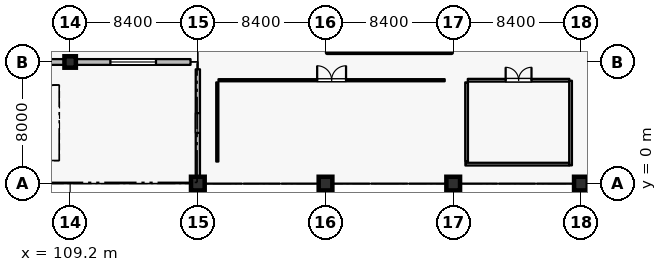
"""IFC4 building model, lengths in metres.
Left out: names, types, materials, properties, quantities, classifications, styles, units other than length and angle.
Written with IfcOpenShell. Run it as: python <this file> out.ifc"""

import sys

from ifc_helpers import new_model, si_unit, direction, frame, frame_2d, origin, origin_2d, place, context, subcontext, project, spatial, rectangle, circle, extrude, element, fill, save


model = new_model("IFC4")
c1 = context("Model", 3, precision=1e-05, world=origin(), true_north=direction((0.0, 1.0)))
c2 = subcontext(c1, "Body", "Model", "MODEL_VIEW")
j1 = project(units=[si_unit("LENGTHUNIT", "METRE"), si_unit("PLANEANGLEUNIT", "RADIAN")], contexts=[c1])
p1 = place(None, origin())
s1 = spatial("IfcSite", under=j1, at=p1, CompositionType="ELEMENT")
p2 = place(p1, origin())
s2 = spatial("IfcBuilding", under=s1, at=p2, CompositionType="ELEMENT")
p3 = place(p2, frame((0.0, 0.0, 6.0)))
s3 = spatial("IfcBuildingStorey", under=s2, at=p3, CompositionType="ELEMENT", Elevation=6.0)
p4 = place(p3, frame((109.2, 8.0, 0.0), z_axis=(0.0, 0.0, 1.0), x_axis=(1.0, 0.0, 0.0)))
e1 = element("IfcColumn", 1, at=p4, inside=s3, PredefinedType="COLUMN", context=c2, shape_type="SweptSolid", body=[
    extrude(rectangle(XDim=0.75, YDim=0.75, at=origin_2d()), origin(), (0.0, 0.0, 1.0), 5.4),
])
for number, where, z_axis, x_axis in (
    (2, (117.6, 0.0, 0.0), (0.0, 0.0, 1.0), (1.0, 0.0, 0.0)),
    (3, (126.0, 0.0, 0.0), (0.0, 0.0, 1.0), (1.0, 0.0, 0.0)),
    (4, (134.4, 0.0, 0.0), (0.0, 0.0, 1.0), (1.0, 0.0, 0.0)),
    (5, (142.8, 0.0, 0.0), (0.0, 0.0, 1.0), (1.0, 0.0, 0.0)),
):
    element("IfcColumn", number, at=place(p3, frame(where, z_axis=z_axis, x_axis=x_axis)), inside=s3, PredefinedType="COLUMN", context=c2, shape_type="SweptSolid", body=[
        extrude(circle(Radius=0.45, at=origin_2d()), origin(), (0.0, 0.0, 1.0), 5.4),
    ])
p5 = place(p3, frame((117.12, 8.0, 0.0), z_axis=(0.0, 0.0, 1.0), x_axis=(-1.0, 0.0, 0.0)))
e6 = element("IfcWall", 6, at=p5, inside=s3, PredefinedType="SOLIDWALL", context=c2, shape_type="SweptSolid", body=[
    extrude(rectangle(XDim=7.545, YDim=0.38, at=frame_2d((3.772, 0.0))), origin(), (0.0, 0.0, 1.0), 5.1),
])
p6 = place(p5, frame((2.273, 0.0, 0.95)))
e7 = element("IfcOpeningElement", 7, at=p6, cuts=e6, PredefinedType="OPENING", context=c2, shape_type="SweptSolid", body=[
    extrude(rectangle(XDim=3.0, YDim=2.2, at=frame_2d((1.5, 1.1))), frame((0.0, 0.2, 0.0), z_axis=(0.0, -1.0, 0.0), x_axis=(1.0, 0.0, 0.0)), (0.0, 0.0, 1.0), 0.4),
])
p7 = place(p3, frame((108.825, 8.0, 0.0), z_axis=(0.0, 0.0, 1.0), x_axis=(-1.0, 0.0, 0.0)))
e8 = element("IfcWall", 8, at=p7, inside=s3, PredefinedType="SOLIDWALL", context=c2, shape_type="SweptSolid", body=[
    extrude(rectangle(XDim=7.65, YDim=0.38, at=frame_2d((3.825, 0.0))), origin(), (0.0, 0.0, 1.0), 4.45),
])
p8 = place(p7, frame((2.825, 0.0, 0.0)))
e9 = element("IfcOpeningElement", 9, at=p8, cuts=e8, PredefinedType="OPENING", context=c2, shape_type="SweptSolid", body=[
    extrude(rectangle(XDim=2.0, YDim=2.4, at=frame_2d((1.0, 1.2))), frame((0.0, 0.2, 0.0), z_axis=(0.0, -1.0, 0.0), x_axis=(1.0, 0.0, 0.0)), (0.0, 0.0, 1.0), 0.4),
])
p9 = place(p3, frame((117.6, 0.45, 0.0), z_axis=(0.0, 0.0, 1.0), x_axis=(0.0, 1.0, 0.0)))
e10 = element("IfcWall", 10, at=p9, inside=s3, PredefinedType="SOLIDWALL", context=c2, shape_type="SweptSolid", body=[
    extrude(rectangle(XDim=7.07, YDim=0.28, at=frame_2d((3.535, 0.0))), origin(), (0.0, 0.0, 1.0), 3.45),
])
p10 = place(p9, frame((2.885, 0.0, 0.75)))
e11 = element("IfcOpeningElement", 11, at=p10, cuts=e10, PredefinedType="OPENING", context=c2, shape_type="SweptSolid", body=[
    extrude(rectangle(XDim=1.3, YDim=1.65, at=frame_2d((0.65, 0.825))), frame((0.0, 0.15, 0.0), z_axis=(0.0, -1.0, 0.0), x_axis=(1.0, 0.0, 0.0)), (0.0, 0.0, 1.0), 0.3),
])
p11 = place(p3, frame((118.96, 6.8, 0.0), z_axis=(0.0, 0.0, 1.0), x_axis=(1.0, 0.0, 0.0)))
e12 = element("IfcWall", 12, at=p11, inside=s3, PredefinedType="PARTITIONING", context=c2, shape_type="SweptSolid", body=[
    extrude(rectangle(XDim=14.88, YDim=0.14, at=frame_2d((7.44, 0.0))), origin(), (0.0, 0.0, 1.0), 5.045),
])
p12 = place(p11, frame((6.49, 0.0, 0.0)))
e13 = element("IfcOpeningElement", 13, at=p12, cuts=e12, PredefinedType="OPENING", context=c2, shape_type="SweptSolid", body=[
    extrude(rectangle(XDim=1.9, YDim=2.4, at=frame_2d((0.95, 1.2))), frame((0.0, 0.08, 0.0), z_axis=(0.0, -1.0, 0.0), x_axis=(1.0, 0.0, 0.0)), (0.0, 0.0, 1.0), 0.16),
])
p13 = place(p3, frame((118.88, 1.45, 0.0), z_axis=(0.0, 0.0, 1.0), x_axis=(0.0, 1.0, 0.0)))
e14 = element("IfcWall", 14, at=p13, inside=s3, PredefinedType="PARTITIONING", context=c2, shape_type="SweptSolid", body=[
    extrude(rectangle(XDim=5.21, YDim=0.14, at=frame_2d((2.605, 0.0))), origin(), (0.0, 0.0, 1.0), 5.045),
])
p14 = place(p3, frame((135.36, 6.8, 0.0), z_axis=(0.0, 0.0, 1.0), x_axis=(1.0, 0.0, 0.0)))
e15 = element("IfcWall", 15, at=p14, inside=s3, PredefinedType="PARTITIONING", context=c2, shape_type="SweptSolid", body=[
    extrude(rectangle(XDim=6.68, YDim=0.18, at=frame_2d((3.34, 0.0))), origin(), (0.0, 0.0, 1.0), 5.045),
])
p15 = place(p14, frame((2.49, 0.0, 0.0)))
e16 = element("IfcOpeningElement", 16, at=p15, cuts=e15, PredefinedType="OPENING", context=c2, shape_type="SweptSolid", body=[
    extrude(rectangle(XDim=1.7, YDim=2.3, at=frame_2d((0.85, 1.15))), frame((0.0, 0.1, 0.0), z_axis=(0.0, -1.0, 0.0), x_axis=(1.0, 0.0, 0.0)), (0.0, 0.0, 1.0), 0.2),
])
p16 = place(p3, frame((135.28, 1.45, 0.0), z_axis=(0.0, 0.0, 1.0), x_axis=(0.0, 1.0, 0.0)))
e17 = element("IfcWall", 17, at=p16, inside=s3, PredefinedType="PARTITIONING", context=c2, shape_type="SweptSolid", body=[
    extrude(rectangle(XDim=5.21, YDim=0.18, at=frame_2d((2.605, 0.0))), origin(), (0.0, 0.0, 1.0), 5.045),
])
p17 = place(p3, frame((142.12, 1.2, 0.0), z_axis=(0.0, 0.0, 1.0), x_axis=(0.0, 1.0, 0.0)))
e18 = element("IfcWall", 18, at=p17, inside=s3, PredefinedType="PARTITIONING", context=c2, shape_type="SweptSolid", body=[
    extrude(rectangle(XDim=5.568, YDim=0.18, at=frame_2d((2.784, 0.0))), origin(), (0.0, 0.0, 1.0), 5.045),
])
p18 = place(p3, frame((135.2, 1.28, 0.0), z_axis=(0.0, 0.0, 1.0), x_axis=(1.0, 0.0, 0.0)))
e19 = element("IfcWall", 19, at=p18, inside=s3, PredefinedType="PARTITIONING", context=c2, shape_type="SweptSolid", body=[
    extrude(rectangle(XDim=6.83, YDim=0.18, at=frame_2d((3.415, 0.0))), origin(), (0.0, 0.0, 1.0), 5.045),
])
p19 = place(p6, origin())
e20 = element("IfcWindow", 20, at=p19, inside=s3, PartitioningType="DOUBLE_PANEL_VERTICAL", PredefinedType="WINDOW", context=c2, shape_type="SweptSolid", body=[
    extrude(rectangle(XDim=3.0, YDim=2.2, at=frame_2d((1.5, 1.1))), frame((0.0, 0.03, 0.0), z_axis=(0.0, -1.0, 0.0), x_axis=(1.0, 0.0, 0.0)), (0.0, 0.0, 1.0), 0.06),
])
fill(e7, e20)
p20 = place(p10, origin())
e21 = element("IfcWindow", 21, at=p20, inside=s3, PartitioningType="SINGLE_PANEL", PredefinedType="WINDOW", context=c2, shape_type="SweptSolid", body=[
    extrude(rectangle(XDim=1.3, YDim=1.65, at=frame_2d((0.65, 0.825))), frame((0.0, 0.03, 0.0), z_axis=(0.0, -1.0, 0.0), x_axis=(1.0, 0.0, 0.0)), (0.0, 0.0, 1.0), 0.06),
])
fill(e11, e21)
p21 = place(p12, origin())
e22 = element("IfcDoor", 22, at=p21, inside=s3, OperationType="DOUBLE_DOOR_SINGLE_SWING", PredefinedType="DOOR", context=c2, shape_type="SweptSolid", body=[
    extrude(rectangle(XDim=1.9, YDim=2.4, at=frame_2d((0.95, 1.2))), frame((0.0, 0.025, 0.0), z_axis=(0.0, -1.0, 0.0), x_axis=(1.0, 0.0, 0.0)), (0.0, 0.0, 1.0), 0.05),
])
fill(e13, e22)
p22 = place(p15, origin())
e23 = element("IfcDoor", 23, at=p22, inside=s3, OperationType="DOUBLE_DOOR_SINGLE_SWING", PredefinedType="DOOR", context=c2, shape_type="SweptSolid", body=[
    extrude(rectangle(XDim=1.7, YDim=2.3, at=frame_2d((0.85, 1.15))), frame((0.0, 0.025, 0.0), z_axis=(0.0, -1.0, 0.0), x_axis=(1.0, 0.0, 0.0)), (0.0, 0.0, 1.0), 0.05),
])
fill(e16, e23)
save(model, sys.argv[1])
